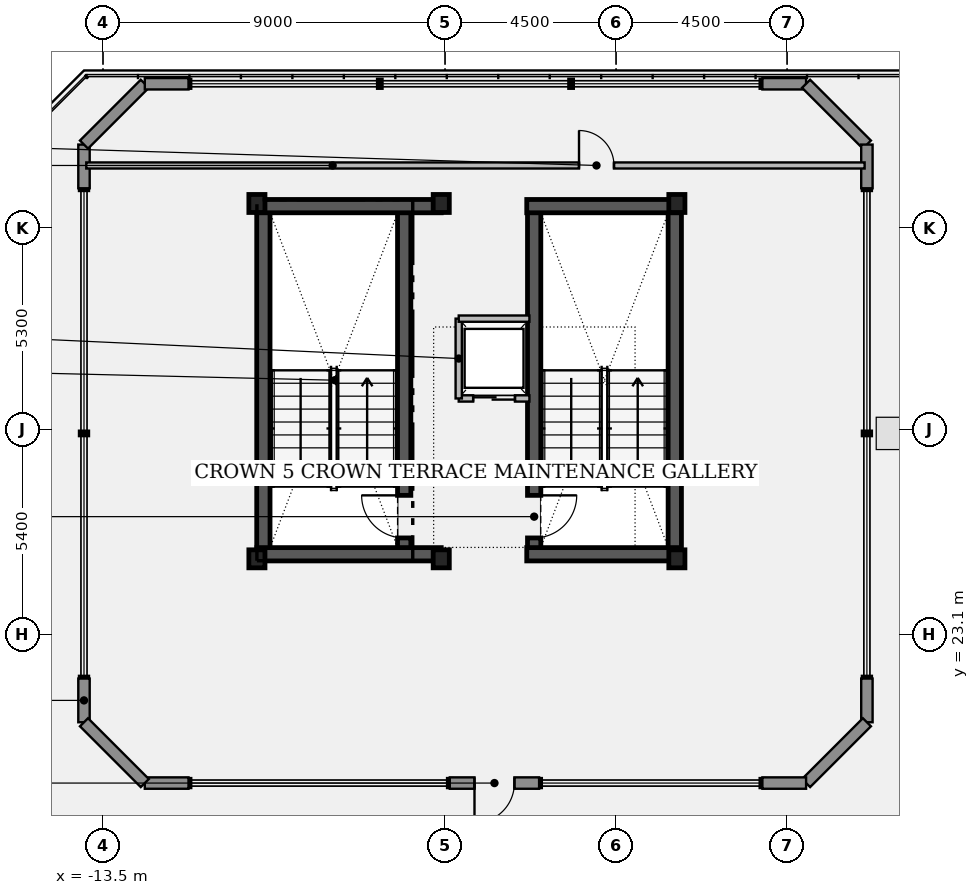
"""IFC4 building model, lengths in metres.
Left out: names, types, materials, properties, quantities, classifications, styles, units other than length and angle.
Written with IfcOpenShell. Run it as: python <this file> out.ifc"""

import sys

from ifc_helpers import new_model, si_unit, direction, frame, frame_2d, origin, origin_2d, place, context, subcontext, project, spatial, rectangle, i_section, extrude, element, fill, save


model = new_model("IFC4")
c1 = context("Model", 3, precision=1e-05, world=origin(), true_north=direction((0.0, 1.0)))
c2 = subcontext(c1, "Body", "Model", "MODEL_VIEW")
j1 = project(units=[si_unit("LENGTHUNIT", "METRE"), si_unit("PLANEANGLEUNIT", "RADIAN")], contexts=[c1])
p1 = place(None, origin())
s1 = spatial("IfcSite", under=j1, at=p1, CompositionType="ELEMENT")
p2 = place(p1, origin())
s2 = spatial("IfcBuilding", under=s1, at=p2, CompositionType="ELEMENT")
p3 = place(p2, frame((0.0, 0.0, 312.45)))
s3 = spatial("IfcBuildingStorey", under=s2, at=p3, CompositionType="ELEMENT", Elevation=312.45)
p4 = place(p3, frame((-5.575, 25.1, -0.19), z_axis=(0.0, 0.0, 1.0), x_axis=(0.0, 1.0, 0.0)))
e1 = element("IfcWall", 1, at=p4, inside=s3, PredefinedType="SHEAR", context=c2, shape_type="SweptSolid", body=[
    extrude(rectangle(XDim=9.35, YDim=0.35, at=frame_2d((4.675, 0.0))), origin(), (0.0, 0.0, 1.0), 3.8),
])
p5 = place(p4, frame((0.55, 0.0, 0.19)))
e2 = element("IfcOpeningElement", 2, at=p5, cuts=e1, PredefinedType="OPENING", context=c2, shape_type="SweptSolid", body=[
    extrude(rectangle(XDim=1.12, YDim=2.22, at=frame_2d((0.56, 1.11))), frame((0.0, 0.185, 0.0), z_axis=(0.0, -1.0, 0.0), x_axis=(1.0, 0.0, 0.0)), (0.0, 0.0, 1.0), 0.37),
])
p6 = place(p3, frame((-9.28, 34.45, -0.19), z_axis=(0.0, 0.0, 1.0), x_axis=(0.0, -1.0, 0.0)))
e3 = element("IfcWall", 3, at=p6, inside=s3, PredefinedType="SHEAR", context=c2, shape_type="SweptSolid", body=[
    extrude(rectangle(XDim=9.35, YDim=0.35, at=frame_2d((4.675, 0.0))), origin(), (0.0, 0.0, 1.0), 3.8),
])
for number, where, z_axis, x_axis in (
    (4, (-9.45, 25.22, -0.19), (0.0, 0.0, 1.0), (1.0, 0.0, 0.0)),
    (5, (-9.45, 34.38, -0.19), (0.0, 0.0, 1.0), (1.0, 0.0, 0.0)),
):
    element("IfcWall", number, at=place(p3, frame(where, z_axis=z_axis, x_axis=x_axis)), inside=s3, PredefinedType="SHEAR", context=c2, shape_type="SweptSolid", body=[
        extrude(rectangle(XDim=4.85, YDim=0.35, at=frame_2d((2.425, 0.0))), origin(), (0.0, 0.0, 1.0), 3.8),
    ])
p7 = place(p3, frame((-2.155, 34.45, -0.19), z_axis=(0.0, 0.0, 1.0), x_axis=(0.0, -1.0, 0.0)))
e6 = element("IfcWall", 6, at=p7, inside=s3, PredefinedType="SHEAR", context=c2, shape_type="SweptSolid", body=[
    extrude(rectangle(XDim=9.35, YDim=0.35, at=frame_2d((4.675, 0.0))), origin(), (0.0, 0.0, 1.0), 3.8),
])
p8 = place(p7, frame((7.68, 0.0, 0.19)))
e7 = element("IfcOpeningElement", 7, at=p8, cuts=e6, PredefinedType="OPENING", context=c2, shape_type="SweptSolid", body=[
    extrude(rectangle(XDim=1.12, YDim=2.22, at=frame_2d((0.56, 1.11))), frame((0.0, 0.185, 0.0), z_axis=(0.0, -1.0, 0.0), x_axis=(1.0, 0.0, 0.0)), (0.0, 0.0, 1.0), 0.37),
])
p9 = place(p3, frame((1.545, 25.1, -0.19), z_axis=(0.0, 0.0, 1.0), x_axis=(0.0, 1.0, 0.0)))
e8 = element("IfcWall", 8, at=p9, inside=s3, PredefinedType="SHEAR", context=c2, shape_type="SweptSolid", body=[
    extrude(rectangle(XDim=9.35, YDim=0.35, at=frame_2d((4.675, 0.0))), origin(), (0.0, 0.0, 1.0), 3.8),
])
for number, where, z_axis, x_axis in (
    (9, (-2.35, 25.22, -0.19), (0.0, 0.0, 1.0), (1.0, 0.0, 0.0)),
    (10, (-2.35, 34.38, -0.19), (0.0, 0.0, 1.0), (1.0, 0.0, 0.0)),
):
    element("IfcWall", number, at=place(p3, frame(where, z_axis=z_axis, x_axis=x_axis)), inside=s3, PredefinedType="SHEAR", context=c2, shape_type="SweptSolid", body=[
        extrude(rectangle(XDim=3.95, YDim=0.35, at=frame_2d((1.975, 0.0))), origin(), (0.0, 0.0, 1.0), 3.8),
    ])
for number, where, z_axis, x_axis in (
    (11, (-9.45, 25.1, 0.0), (0.0, 0.0, 1.0), (1.0, 0.0, 0.0)),
    (12, (-4.6, 25.1, 0.0), (0.0, 0.0, 1.0), (1.0, 0.0, 0.0)),
    (13, (1.6, 25.1, 0.0), (0.0, 0.0, 1.0), (1.0, 0.0, 0.0)),
    (14, (-9.45, 34.45, 0.0), (0.0, 0.0, 1.0), (1.0, 0.0, 0.0)),
    (15, (-4.6, 34.45, 0.0), (0.0, 0.0, 1.0), (1.0, 0.0, 0.0)),
    (16, (1.6, 34.45, 0.0), (0.0, 0.0, 1.0), (1.0, 0.0, 0.0)),
):
    element("IfcColumn", number, at=place(p3, frame(where, z_axis=z_axis, x_axis=x_axis)), inside=s3, PredefinedType="COLUMN", context=c2, shape_type="SweptSolid", body=[
        extrude(i_section(OverallWidth=0.424, OverallDepth=0.474, WebThickness=0.048, FlangeThickness=0.077, at=origin_2d()), origin(), (0.0, 0.0, 1.0), 3.8),
    ])
for number, where, z_axis, x_axis in (
    (17, (-14.0, 20.8, 0.0), (0.0, 0.0, 1.0), (0.0, 1.0, 0.0)),
    (18, (-14.0, 34.85, 0.0), (0.0, 0.0, 1.0), (0.0, 1.0, 0.0)),
):
    element("IfcWall", number, at=place(p3, frame(where, z_axis=z_axis, x_axis=x_axis)), inside=s3, PredefinedType="STANDARD", context=c2, shape_type="SweptSolid", body=[
        extrude(rectangle(XDim=1.15, YDim=0.3, at=frame_2d((0.575, 0.0))), origin(), (0.0, 0.0, 1.0), 3.56),
    ])
p10 = place(p3, frame((-14.0, 36.0, 0.0), z_axis=(0.0, 0.0, 1.0), x_axis=(0.707106781187, 0.707106781187, 0.0)))
e19 = element("IfcWall", 19, at=p10, inside=s3, PredefinedType="STANDARD", context=c2, shape_type="SweptSolid", body=[
    extrude(rectangle(XDim=2.263, YDim=0.3, at=frame_2d((1.131, 0.0))), origin(), (0.0, 0.0, 1.0), 3.56),
])
for number, where, z_axis, x_axis in (
    (20, (-12.4, 37.6, 0.0), (0.0, 0.0, 1.0), (1.0, 0.0, 0.0)),
    (21, (3.85, 37.6, 0.0), (0.0, 0.0, 1.0), (1.0, 0.0, 0.0)),
):
    element("IfcWall", number, at=place(p3, frame(where, z_axis=z_axis, x_axis=x_axis)), inside=s3, PredefinedType="STANDARD", context=c2, shape_type="SweptSolid", body=[
        extrude(rectangle(XDim=1.15, YDim=0.3, at=frame_2d((0.575, 0.0))), origin(), (0.0, 0.0, 1.0), 3.56),
    ])
p11 = place(p3, frame((5.0, 37.6, 0.0), z_axis=(0.0, 0.0, 1.0), x_axis=(0.707106781187, -0.707106781187, 0.0)))
e22 = element("IfcWall", 22, at=p11, inside=s3, PredefinedType="STANDARD", context=c2, shape_type="SweptSolid", body=[
    extrude(rectangle(XDim=2.263, YDim=0.3, at=frame_2d((1.131, 0.0))), origin(), (0.0, 0.0, 1.0), 3.56),
])
for number, where, z_axis, x_axis in (
    (23, (6.6, 36.0, 0.0), (0.0, 0.0, 1.0), (0.0, -1.0, 0.0)),
    (24, (6.6, 21.95, 0.0), (0.0, 0.0, 1.0), (0.0, -1.0, 0.0)),
):
    element("IfcWall", number, at=place(p3, frame(where, z_axis=z_axis, x_axis=x_axis)), inside=s3, PredefinedType="STANDARD", context=c2, shape_type="SweptSolid", body=[
        extrude(rectangle(XDim=1.15, YDim=0.3, at=frame_2d((0.575, 0.0))), origin(), (0.0, 0.0, 1.0), 3.56),
    ])
p12 = place(p3, frame((6.6, 20.8, 0.0), z_axis=(0.0, 0.0, 1.0), x_axis=(-0.707106781187, -0.707106781187, 0.0)))
e25 = element("IfcWall", 25, at=p12, inside=s3, PredefinedType="STANDARD", context=c2, shape_type="SweptSolid", body=[
    extrude(rectangle(XDim=2.263, YDim=0.3, at=frame_2d((1.131, 0.0))), origin(), (0.0, 0.0, 1.0), 3.56),
])
p13 = place(p3, frame((5.0, 19.2, 0.0), z_axis=(0.0, 0.0, 1.0), x_axis=(-1.0, 0.0, 0.0)))
e26 = element("IfcWall", 26, at=p13, inside=s3, PredefinedType="STANDARD", context=c2, shape_type="SweptSolid", body=[
    extrude(rectangle(XDim=1.15, YDim=0.3, at=frame_2d((0.575, 0.0))), origin(), (0.0, 0.0, 1.0), 3.56),
])
p14 = place(p3, frame((-2.025, 19.2, 0.0), z_axis=(0.0, 0.0, 1.0), x_axis=(-1.0, 0.0, 0.0)))
e27 = element("IfcWall", 27, at=p14, inside=s3, PredefinedType="STANDARD", context=c2, shape_type="SweptSolid", body=[
    extrude(rectangle(XDim=2.35, YDim=0.3, at=frame_2d((1.175, 0.0))), origin(), (0.0, 0.0, 1.0), 3.56),
])
p15 = place(p14, frame((0.65, 0.0, 0.0)))
e28 = element("IfcOpeningElement", 28, at=p15, cuts=e27, PredefinedType="OPENING", context=c2, shape_type="SweptSolid", body=[
    extrude(rectangle(XDim=1.05, YDim=2.2, at=frame_2d((0.525, 1.1))), frame((0.0, 0.16, 0.0), z_axis=(0.0, -1.0, 0.0), x_axis=(1.0, 0.0, 0.0)), (0.0, 0.0, 1.0), 0.32),
])
p16 = place(p3, frame((-11.25, 19.2, 0.0), z_axis=(0.0, 0.0, 1.0), x_axis=(-1.0, 0.0, 0.0)))
e29 = element("IfcWall", 29, at=p16, inside=s3, PredefinedType="STANDARD", context=c2, shape_type="SweptSolid", body=[
    extrude(rectangle(XDim=1.15, YDim=0.3, at=frame_2d((0.575, 0.0))), origin(), (0.0, 0.0, 1.0), 3.56),
])
p17 = place(p3, frame((-12.4, 19.2, 0.0), z_axis=(0.0, 0.0, 1.0), x_axis=(-0.707106781187, 0.707106781187, 0.0)))
e30 = element("IfcWall", 30, at=p17, inside=s3, PredefinedType="STANDARD", context=c2, shape_type="SweptSolid", body=[
    extrude(rectangle(XDim=2.263, YDim=0.3, at=frame_2d((1.131, 0.0))), origin(), (0.0, 0.0, 1.0), 3.56),
])
p18 = place(p3, frame((-4.14, 29.32, 0.0), z_axis=(0.0, 0.0, 1.0), x_axis=(1.0, 0.0, 0.0)))
e31 = element("IfcWall", 31, at=p18, inside=s3, PredefinedType="PARTITIONING", context=c2, shape_type="SweptSolid", body=[
    extrude(rectangle(XDim=1.86, YDim=0.165, at=frame_2d((0.93, 0.0))), origin(), (0.0, 0.0, 1.0), 3.56),
])
p19 = place(p18, frame((0.38, 0.0, 0.0)))
e32 = element("IfcOpeningElement", 32, at=p19, cuts=e31, PredefinedType="OPENING", context=c2, shape_type="SweptSolid", body=[
    extrude(rectangle(XDim=1.1, YDim=2.25, at=frame_2d((0.55, 1.125))), frame((0.0, 0.093, 0.0), z_axis=(0.0, -1.0, 0.0), x_axis=(1.0, 0.0, 0.0)), (0.0, 0.0, 1.0), 0.185),
])
p20 = place(p3, frame((-13.94, 35.45, 0.0), z_axis=(0.0, 0.0, 1.0), x_axis=(1.0, 0.0, 0.0)))
e33 = element("IfcWall", 33, at=p20, inside=s3, PredefinedType="PARTITIONING", context=c2, shape_type="SweptSolid", body=[
    extrude(rectangle(XDim=20.48, YDim=0.16, at=frame_2d((10.24, 0.0))), origin(), (0.0, 0.0, 1.0), 3.56),
])
p21 = place(p20, frame((12.965, 0.0, 0.0)))
e34 = element("IfcOpeningElement", 34, at=p21, cuts=e33, PredefinedType="OPENING", context=c2, shape_type="SweptSolid", body=[
    extrude(rectangle(XDim=0.92, YDim=2.12, at=frame_2d((0.46, 1.06))), frame((0.0, 0.09, 0.0), z_axis=(0.0, -1.0, 0.0), x_axis=(1.0, 0.0, 0.0)), (0.0, 0.0, 1.0), 0.18),
])
p22 = place(p3, frame((-4.14, 29.32, 0.0), z_axis=(0.0, 0.0, 1.0), x_axis=(0.0, 1.0, 0.0)))
e35 = element("IfcWall", 35, at=p22, inside=s3, PredefinedType="PARTITIONING", context=c2, shape_type="SweptSolid", body=[
    extrude(rectangle(XDim=2.1, YDim=0.165, at=frame_2d((1.05, 0.0))), origin(), (0.0, 0.0, 1.0), 2.549),
])
p23 = place(p3, frame((-4.14, 31.42, 0.0), z_axis=(0.0, 0.0, 1.0), x_axis=(1.0, 0.0, 0.0)))
e36 = element("IfcWall", 36, at=p23, inside=s3, PredefinedType="PARTITIONING", context=c2, shape_type="SweptSolid", body=[
    extrude(rectangle(XDim=1.86, YDim=0.165, at=frame_2d((0.93, 0.0))), origin(), (0.0, 0.0, 1.0), 3.56),
])
p24 = place(p15, origin())
e37 = element("IfcDoor", 37, at=p24, inside=s3, OperationType="SINGLE_SWING_RIGHT", PredefinedType="DOOR", context=c2, shape_type="SweptSolid", body=[
    extrude(rectangle(XDim=1.05, YDim=2.2, at=frame_2d((0.525, 1.1))), frame((0.0, 0.025, 0.0), z_axis=(0.0, -1.0, 0.0), x_axis=(1.0, 0.0, 0.0)), (0.0, 0.0, 1.0), 0.05),
])
fill(e28, e37)
p25 = place(p5, origin())
e38 = element("IfcDoor", 38, at=p25, inside=s3, OperationType="SINGLE_SWING_RIGHT", PredefinedType="DOOR", context=c2, shape_type="SweptSolid", body=[
    extrude(rectangle(XDim=1.12, YDim=2.22, at=frame_2d((0.56, 1.11))), frame((0.0, 0.025, 0.0), z_axis=(0.0, -1.0, 0.0), x_axis=(1.0, 0.0, 0.0)), (0.0, 0.0, 1.0), 0.05),
])
fill(e2, e38)
p26 = place(p8, origin())
e39 = element("IfcDoor", 39, at=p26, inside=s3, OperationType="SINGLE_SWING_LEFT", PredefinedType="DOOR", context=c2, shape_type="SweptSolid", body=[
    extrude(rectangle(XDim=1.12, YDim=2.22, at=frame_2d((0.56, 1.11))), frame((0.0, 0.025, 0.0), z_axis=(0.0, -1.0, 0.0), x_axis=(1.0, 0.0, 0.0)), (0.0, 0.0, 1.0), 0.05),
])
fill(e7, e39)
p27 = place(p19, origin())
e40 = element("IfcDoor", 40, at=p27, inside=s3, OperationType="SLIDING_TO_LEFT", PredefinedType="DOOR", context=c2, shape_type="SweptSolid", body=[
    extrude(rectangle(XDim=1.1, YDim=2.25, at=frame_2d((0.55, 1.125))), frame((0.0, 0.025, 0.0), z_axis=(0.0, -1.0, 0.0), x_axis=(1.0, 0.0, 0.0)), (0.0, 0.0, 1.0), 0.05),
])
fill(e32, e40)
p28 = place(p21, origin())
e41 = element("IfcDoor", 41, at=p28, inside=s3, OperationType="SINGLE_SWING_LEFT", PredefinedType="DOOR", context=c2, shape_type="SweptSolid", body=[
    extrude(rectangle(XDim=0.92, YDim=2.12, at=frame_2d((0.46, 1.06))), frame((0.0, 0.025, 0.0), z_axis=(0.0, -1.0, 0.0), x_axis=(1.0, 0.0, 0.0)), (0.0, 0.0, 1.0), 0.05),
])
fill(e34, e41)
save(model, sys.argv[1])
